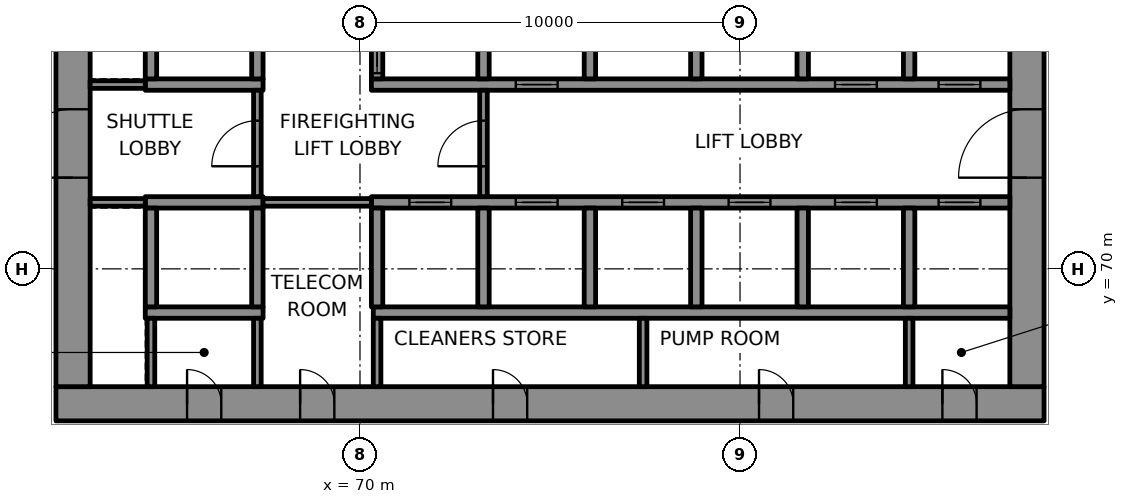
"""IFC4 building model, lengths in metres.
Left out: names, types, materials, properties, quantities, classifications, styles, units other than length and angle.
Written with IfcOpenShell. Run it as: python <this file> out.ifc"""

import sys

from ifc_helpers import new_model, si_unit, direction, frame, frame_2d, origin, place, context, subcontext, project, spatial, rectangle, extrude, element, fill, save


model = new_model("IFC4")
c1 = context("Model", 3, precision=1e-05, world=origin(), true_north=direction((0.0, 1.0)))
c2 = subcontext(c1, "Body", "Model", "MODEL_VIEW")
j1 = project(units=[si_unit("LENGTHUNIT", "METRE"), si_unit("PLANEANGLEUNIT", "RADIAN")], contexts=[c1])
p1 = place(None, origin())
s1 = spatial("IfcSite", under=j1, at=p1, CompositionType="ELEMENT")
p2 = place(p1, origin())
s2 = spatial("IfcBuilding", under=s1, at=p2, CompositionType="ELEMENT")
p3 = place(p2, frame((0.0, 0.0, 98.8)))
s3 = spatial("IfcBuildingStorey", under=s2, at=p3, CompositionType="ELEMENT", Elevation=98.8)
p4 = place(p3, frame((62.0, 66.45, 0.0), z_axis=(0.0, 0.0, 1.0), x_axis=(1.0, 0.0, 0.0)))
e1 = element("IfcWall", 1, at=p4, inside=s3, PredefinedType="SHEAR", context=c2, shape_type="SweptSolid", body=[
    extrude(rectangle(XDim=26.0, YDim=0.9, at=frame_2d((13.0, 0.0))), origin(), (0.0, 0.0, 1.0), 4.0),
])
p5 = place(p4, frame((3.45, 0.0, 0.0)))
e2 = element("IfcOpeningElement", 2, at=p5, cuts=e1, PredefinedType="OPENING", context=c2, shape_type="SweptSolid", body=[
    extrude(rectangle(XDim=0.9, YDim=2.1, at=frame_2d((0.45, 1.05))), frame((0.0, 0.46, 0.0), z_axis=(0.0, -1.0, 0.0), x_axis=(1.0, 0.0, 0.0)), (0.0, 0.0, 1.0), 0.92),
])
p6 = place(p4, frame((6.425, 0.0, 0.0)))
e3 = element("IfcOpeningElement", 3, at=p6, cuts=e1, PredefinedType="OPENING", context=c2, shape_type="SweptSolid", body=[
    extrude(rectangle(XDim=0.9, YDim=2.1, at=frame_2d((0.45, 1.05))), frame((0.0, 0.46, 0.0), z_axis=(0.0, -1.0, 0.0), x_axis=(1.0, 0.0, 0.0)), (0.0, 0.0, 1.0), 0.92),
])
p7 = place(p4, frame((11.5, 0.0, 0.0)))
e4 = element("IfcOpeningElement", 4, at=p7, cuts=e1, PredefinedType="OPENING", context=c2, shape_type="SweptSolid", body=[
    extrude(rectangle(XDim=0.9, YDim=2.1, at=frame_2d((0.45, 1.05))), frame((0.0, 0.46, 0.0), z_axis=(0.0, -1.0, 0.0), x_axis=(1.0, 0.0, 0.0)), (0.0, 0.0, 1.0), 0.92),
])
p8 = place(p4, frame((18.5, 0.0, 0.0)))
e5 = element("IfcOpeningElement", 5, at=p8, cuts=e1, PredefinedType="OPENING", context=c2, shape_type="SweptSolid", body=[
    extrude(rectangle(XDim=0.9, YDim=2.1, at=frame_2d((0.45, 1.05))), frame((0.0, 0.46, 0.0), z_axis=(0.0, -1.0, 0.0), x_axis=(1.0, 0.0, 0.0)), (0.0, 0.0, 1.0), 0.92),
])
p9 = place(p4, frame((23.325, 0.0, 0.0)))
e6 = element("IfcOpeningElement", 6, at=p9, cuts=e1, PredefinedType="OPENING", context=c2, shape_type="SweptSolid", body=[
    extrude(rectangle(XDim=0.9, YDim=2.1, at=frame_2d((0.45, 1.05))), frame((0.0, 0.46, 0.0), z_axis=(0.0, -1.0, 0.0), x_axis=(1.0, 0.0, 0.0)), (0.0, 0.0, 1.0), 0.92),
])
p10 = place(p3, frame((62.45, 66.9, 0.0), z_axis=(0.0, 0.0, 1.0), x_axis=(0.0, 1.0, 0.0)))
e7 = element("IfcWall", 7, at=p10, inside=s3, PredefinedType="SHEAR", context=c2, shape_type="SweptSolid", body=[
    extrude(rectangle(XDim=16.2, YDim=0.9, at=frame_2d((8.1, 0.0))), origin(), (0.0, 0.0, 1.0), 4.0),
])
p11 = place(p10, frame((5.5, 0.0, 0.0)))
e8 = element("IfcOpeningElement", 8, at=p11, cuts=e7, PredefinedType="OPENING", context=c2, shape_type="SweptSolid", body=[
    extrude(rectangle(XDim=1.8, YDim=2.1, at=frame_2d((0.9, 1.05))), frame((0.0, 0.46, 0.0), z_axis=(0.0, -1.0, 0.0), x_axis=(1.0, 0.0, 0.0)), (0.0, 0.0, 1.0), 0.92),
])
p12 = place(p3, frame((87.55, 66.9, 0.0), z_axis=(0.0, 0.0, 1.0), x_axis=(0.0, 1.0, 0.0)))
e9 = element("IfcWall", 9, at=p12, inside=s3, PredefinedType="SHEAR", context=c2, shape_type="SweptSolid", body=[
    extrude(rectangle(XDim=16.2, YDim=0.9, at=frame_2d((8.1, 0.0))), origin(), (0.0, 0.0, 1.0), 4.0),
])
p13 = place(p12, frame((5.5, 0.0, 0.0)))
e10 = element("IfcOpeningElement", 10, at=p13, cuts=e9, PredefinedType="OPENING", context=c2, shape_type="SweptSolid", body=[
    extrude(rectangle(XDim=1.8, YDim=2.1, at=frame_2d((0.9, 1.05))), frame((0.0, 0.46, 0.0), z_axis=(0.0, -1.0, 0.0), x_axis=(1.0, 0.0, 0.0)), (0.0, 0.0, 1.0), 0.92),
])
p14 = place(p12, frame((12.272, 0.0, 0.0)))
e11 = element("IfcOpeningElement", 11, at=p14, cuts=e9, PredefinedType="OPENING", context=c2, shape_type="SweptSolid", body=[
    extrude(rectangle(XDim=0.9, YDim=2.1, at=frame_2d((0.45, 1.05))), frame((0.0, 0.46, 0.0), z_axis=(0.0, -1.0, 0.0), x_axis=(1.0, 0.0, 0.0)), (0.0, 0.0, 1.0), 0.92),
])
p15 = place(p3, frame((64.35, 68.85, 0.0), z_axis=(0.0, 0.0, 1.0), x_axis=(1.0, 0.0, 0.0)))
e12 = element("IfcWall", 12, at=p15, inside=s3, PredefinedType="SHEAR", context=c2, shape_type="SweptSolid", body=[
    extrude(rectangle(XDim=3.1, YDim=0.3, at=frame_2d((1.55, 0.0))), origin(), (0.0, 0.0, 1.0), 4.0),
])
p16 = place(p3, frame((70.35, 68.85, 0.0), z_axis=(0.0, 0.0, 1.0), x_axis=(1.0, 0.0, 0.0)))
e13 = element("IfcWall", 13, at=p16, inside=s3, PredefinedType="SHEAR", context=c2, shape_type="SweptSolid", body=[
    extrude(rectangle(XDim=16.75, YDim=0.3, at=frame_2d((8.375, 0.0))), origin(), (0.0, 0.0, 1.0), 4.0),
])
p17 = place(p3, frame((64.35, 71.75, 0.0), z_axis=(0.0, 0.0, 1.0), x_axis=(1.0, 0.0, 0.0)))
e14 = element("IfcWall", 14, at=p17, inside=s3, PredefinedType="SHEAR", context=c2, shape_type="SweptSolid", body=[
    extrude(rectangle(XDim=3.1, YDim=0.3, at=frame_2d((1.55, 0.0))), origin(), (0.0, 0.0, 1.0), 4.0),
])
p18 = place(p3, frame((70.3, 71.75, 0.0), z_axis=(0.0, 0.0, 1.0), x_axis=(1.0, 0.0, 0.0)))
e15 = element("IfcWall", 15, at=p18, inside=s3, PredefinedType="SHEAR", context=c2, shape_type="SweptSolid", body=[
    extrude(rectangle(XDim=16.8, YDim=0.3, at=frame_2d((8.4, 0.0))), origin(), (0.0, 0.0, 1.0), 4.0),
])
p19 = place(p18, frame((1.0, 0.0, 0.0)))
e16 = element("IfcOpeningElement", 16, at=p19, cuts=e15, PredefinedType="OPENING", context=c2, shape_type="SweptSolid", body=[
    extrude(rectangle(XDim=1.1, YDim=2.1, at=frame_2d((0.55, 1.05))), frame((0.0, 0.16, 0.0), z_axis=(0.0, -1.0, 0.0), x_axis=(1.0, 0.0, 0.0)), (0.0, 0.0, 1.0), 0.32),
])
p20 = place(p18, frame((3.8, 0.0, 0.0)))
e17 = element("IfcOpeningElement", 17, at=p20, cuts=e15, PredefinedType="OPENING", context=c2, shape_type="SweptSolid", body=[
    extrude(rectangle(XDim=1.1, YDim=2.1, at=frame_2d((0.55, 1.05))), frame((0.0, 0.16, 0.0), z_axis=(0.0, -1.0, 0.0), x_axis=(1.0, 0.0, 0.0)), (0.0, 0.0, 1.0), 0.32),
])
p21 = place(p18, frame((6.6, 0.0, 0.0)))
e18 = element("IfcOpeningElement", 18, at=p21, cuts=e15, PredefinedType="OPENING", context=c2, shape_type="SweptSolid", body=[
    extrude(rectangle(XDim=1.1, YDim=2.1, at=frame_2d((0.55, 1.05))), frame((0.0, 0.16, 0.0), z_axis=(0.0, -1.0, 0.0), x_axis=(1.0, 0.0, 0.0)), (0.0, 0.0, 1.0), 0.32),
])
p22 = place(p18, frame((9.4, 0.0, 0.0)))
e19 = element("IfcOpeningElement", 19, at=p22, cuts=e15, PredefinedType="OPENING", context=c2, shape_type="SweptSolid", body=[
    extrude(rectangle(XDim=1.1, YDim=2.1, at=frame_2d((0.55, 1.05))), frame((0.0, 0.16, 0.0), z_axis=(0.0, -1.0, 0.0), x_axis=(1.0, 0.0, 0.0)), (0.0, 0.0, 1.0), 0.32),
])
p23 = place(p18, frame((12.2, 0.0, 0.0)))
e20 = element("IfcOpeningElement", 20, at=p23, cuts=e15, PredefinedType="OPENING", context=c2, shape_type="SweptSolid", body=[
    extrude(rectangle(XDim=1.1, YDim=2.1, at=frame_2d((0.55, 1.05))), frame((0.0, 0.16, 0.0), z_axis=(0.0, -1.0, 0.0), x_axis=(1.0, 0.0, 0.0)), (0.0, 0.0, 1.0), 0.32),
])
p24 = place(p18, frame((14.925, 0.0, 0.0)))
e21 = element("IfcOpeningElement", 21, at=p24, cuts=e15, PredefinedType="OPENING", context=c2, shape_type="SweptSolid", body=[
    extrude(rectangle(XDim=1.1, YDim=2.1, at=frame_2d((0.55, 1.05))), frame((0.0, 0.16, 0.0), z_axis=(0.0, -1.0, 0.0), x_axis=(1.0, 0.0, 0.0)), (0.0, 0.0, 1.0), 0.32),
])
p25 = place(p3, frame((64.35, 74.85, 0.0), z_axis=(0.0, 0.0, 1.0), x_axis=(1.0, 0.0, 0.0)))
e22 = element("IfcWall", 22, at=p25, inside=s3, PredefinedType="SHEAR", context=c2, shape_type="SweptSolid", body=[
    extrude(rectangle(XDim=3.1, YDim=0.3, at=frame_2d((1.55, 0.0))), origin(), (0.0, 0.0, 1.0), 4.0),
])
p26 = place(p3, frame((70.3, 74.85, 0.0), z_axis=(0.0, 0.0, 1.0), x_axis=(1.0, 0.0, 0.0)))
e23 = element("IfcWall", 23, at=p26, inside=s3, PredefinedType="SHEAR", context=c2, shape_type="SweptSolid", body=[
    extrude(rectangle(XDim=16.8, YDim=0.3, at=frame_2d((8.4, 0.0))), origin(), (0.0, 0.0, 1.0), 4.0),
])
p27 = place(p26, frame((3.8, 0.0, 0.0)))
e24 = element("IfcOpeningElement", 24, at=p27, cuts=e23, PredefinedType="OPENING", context=c2, shape_type="SweptSolid", body=[
    extrude(rectangle(XDim=1.1, YDim=2.1, at=frame_2d((0.55, 1.05))), frame((0.0, 0.16, 0.0), z_axis=(0.0, -1.0, 0.0), x_axis=(1.0, 0.0, 0.0)), (0.0, 0.0, 1.0), 0.32),
])
p28 = place(p26, frame((12.2, 0.0, 0.0)))
e25 = element("IfcOpeningElement", 25, at=p28, cuts=e23, PredefinedType="OPENING", context=c2, shape_type="SweptSolid", body=[
    extrude(rectangle(XDim=1.1, YDim=2.1, at=frame_2d((0.55, 1.05))), frame((0.0, 0.16, 0.0), z_axis=(0.0, -1.0, 0.0), x_axis=(1.0, 0.0, 0.0)), (0.0, 0.0, 1.0), 0.32),
])
p29 = place(p26, frame((14.925, 0.0, 0.0)))
e26 = element("IfcOpeningElement", 26, at=p29, cuts=e23, PredefinedType="OPENING", context=c2, shape_type="SweptSolid", body=[
    extrude(rectangle(XDim=1.1, YDim=2.1, at=frame_2d((0.55, 1.05))), frame((0.0, 0.16, 0.0), z_axis=(0.0, -1.0, 0.0), x_axis=(1.0, 0.0, 0.0)), (0.0, 0.0, 1.0), 0.32),
])
for number, where, z_axis, x_axis in (
    (27, (64.5, 69.0, 0.0), (0.0, 0.0, 1.0), (0.0, 1.0, 0.0)),
    (28, (64.5, 75.0, 0.0), (0.0, 0.0, 1.0), (0.0, 1.0, 0.0)),
    (29, (67.3, 69.0, 0.0), (0.0, 0.0, 1.0), (0.0, 1.0, 0.0)),
    (30, (67.3, 75.0, 0.0), (0.0, 0.0, 1.0), (0.0, 1.0, 0.0)),
    (31, (70.45, 69.0, 0.0), (0.0, 0.0, 1.0), (0.0, 1.0, 0.0)),
):
    element("IfcWall", number, at=place(p3, frame(where, z_axis=z_axis, x_axis=x_axis)), inside=s3, PredefinedType="SHEAR", context=c2, shape_type="SweptSolid", body=[
        extrude(rectangle(XDim=2.6, YDim=0.3, at=frame_2d((1.3, 0.0))), origin(), (0.0, 0.0, 1.0), 4.0),
    ])
p30 = place(p3, frame((70.45, 75.0, 0.0), z_axis=(0.0, 0.0, 1.0), x_axis=(0.0, 1.0, 0.0)))
e32 = element("IfcWall", 32, at=p30, inside=s3, PredefinedType="SHEAR", context=c2, shape_type="SweptSolid", body=[
    extrude(rectangle(XDim=2.6, YDim=0.3, at=frame_2d((1.3, 0.0))), origin(), (0.0, 0.0, 1.0), 4.0),
])
p31 = place(p30, frame((0.15, 0.0, 0.0)))
e33 = element("IfcOpeningElement", 33, at=p31, cuts=e32, PredefinedType="OPENING", context=c2, shape_type="SweptSolid", body=[
    extrude(rectangle(XDim=1.1, YDim=2.1, at=frame_2d((0.55, 1.05))), frame((0.0, 0.16, 0.0), z_axis=(0.0, -1.0, 0.0), x_axis=(1.0, 0.0, 0.0)), (0.0, 0.0, 1.0), 0.32),
])
for number, where, z_axis, x_axis in (
    (34, (73.25, 69.0, 0.0), (0.0, 0.0, 1.0), (0.0, 1.0, 0.0)),
    (35, (73.25, 75.0, 0.0), (0.0, 0.0, 1.0), (0.0, 1.0, 0.0)),
    (36, (76.05, 69.0, 0.0), (0.0, 0.0, 1.0), (0.0, 1.0, 0.0)),
    (37, (76.05, 75.0, 0.0), (0.0, 0.0, 1.0), (0.0, 1.0, 0.0)),
    (38, (78.85, 69.0, 0.0), (0.0, 0.0, 1.0), (0.0, 1.0, 0.0)),
    (39, (78.85, 75.0, 0.0), (0.0, 0.0, 1.0), (0.0, 1.0, 0.0)),
    (40, (81.65, 69.0, 0.0), (0.0, 0.0, 1.0), (0.0, 1.0, 0.0)),
    (41, (81.65, 75.0, 0.0), (0.0, 0.0, 1.0), (0.0, 1.0, 0.0)),
    (42, (84.45, 69.0, 0.0), (0.0, 0.0, 1.0), (0.0, 1.0, 0.0)),
    (43, (84.45, 75.0, 0.0), (0.0, 0.0, 1.0), (0.0, 1.0, 0.0)),
):
    element("IfcWall", number, at=place(p3, frame(where, z_axis=z_axis, x_axis=x_axis)), inside=s3, PredefinedType="SHEAR", context=c2, shape_type="SweptSolid", body=[
        extrude(rectangle(XDim=2.6, YDim=0.3, at=frame_2d((1.3, 0.0))), origin(), (0.0, 0.0, 1.0), 4.0),
    ])
p32 = place(p3, frame((62.9, 71.75, 0.0), z_axis=(0.0, 0.0, 1.0), x_axis=(1.0, 0.0, 0.0)))
e44 = element("IfcWall", 44, at=p32, inside=s3, PredefinedType="PARTITIONING", context=c2, shape_type="SweptSolid", body=[
    extrude(rectangle(XDim=1.45, YDim=0.2, at=frame_2d((0.725, 0.0))), origin(), (0.0, 0.0, 1.0), 4.0),
])
p33 = place(p3, frame((67.45, 71.75, 0.0), z_axis=(0.0, 0.0, 1.0), x_axis=(1.0, 0.0, 0.0)))
e45 = element("IfcWall", 45, at=p33, inside=s3, PredefinedType="PARTITIONING", context=c2, shape_type="SweptSolid", body=[
    extrude(rectangle(XDim=2.85, YDim=0.2, at=frame_2d((1.425, 0.0))), origin(), (0.0, 0.0, 1.0), 4.0),
])
p34 = place(p3, frame((62.9, 74.85, 0.0), z_axis=(0.0, 0.0, 1.0), x_axis=(1.0, 0.0, 0.0)))
e46 = element("IfcWall", 46, at=p34, inside=s3, PredefinedType="PARTITIONING", context=c2, shape_type="SweptSolid", body=[
    extrude(rectangle(XDim=1.45, YDim=0.2, at=frame_2d((0.725, 0.0))), origin(), (0.0, 0.0, 1.0), 4.0),
])
for number, where, z_axis, x_axis in (
    (47, (64.5, 66.9, 0.0), (0.0, 0.0, 1.0), (0.0, 1.0, 0.0)),
    (48, (67.3, 66.9, 0.0), (0.0, 0.0, 1.0), (0.0, 1.0, 0.0)),
):
    element("IfcWall", number, at=place(p3, frame(where, z_axis=z_axis, x_axis=x_axis)), inside=s3, PredefinedType="PARTITIONING", context=c2, shape_type="SweptSolid", body=[
        extrude(rectangle(XDim=1.8, YDim=0.2, at=frame_2d((0.9, 0.0))), origin(), (0.0, 0.0, 1.0), 4.0),
    ])
p35 = place(p3, frame((67.3, 71.9, 0.0), z_axis=(0.0, 0.0, 1.0), x_axis=(0.0, 1.0, 0.0)))
e49 = element("IfcWall", 49, at=p35, inside=s3, PredefinedType="PARTITIONING", context=c2, shape_type="SweptSolid", body=[
    extrude(rectangle(XDim=2.8, YDim=0.2, at=frame_2d((1.4, 0.0))), origin(), (0.0, 0.0, 1.0), 4.0),
])
p36 = place(p35, frame((0.8, 0.0, 0.0)))
e50 = element("IfcOpeningElement", 50, at=p36, cuts=e49, PredefinedType="OPENING", context=c2, shape_type="SweptSolid", body=[
    extrude(rectangle(XDim=1.2, YDim=2.1, at=frame_2d((0.6, 1.05))), frame((0.0, 0.11, 0.0), z_axis=(0.0, -1.0, 0.0), x_axis=(1.0, 0.0, 0.0)), (0.0, 0.0, 1.0), 0.22),
])
p37 = place(p3, frame((70.45, 66.9, 0.0), z_axis=(0.0, 0.0, 1.0), x_axis=(0.0, 1.0, 0.0)))
e51 = element("IfcWall", 51, at=p37, inside=s3, PredefinedType="PARTITIONING", context=c2, shape_type="SweptSolid", body=[
    extrude(rectangle(XDim=1.8, YDim=0.2, at=frame_2d((0.9, 0.0))), origin(), (0.0, 0.0, 1.0), 4.0),
])
p38 = place(p3, frame((73.25, 71.9, 0.0), z_axis=(0.0, 0.0, 1.0), x_axis=(0.0, 1.0, 0.0)))
e52 = element("IfcWall", 52, at=p38, inside=s3, PredefinedType="PARTITIONING", context=c2, shape_type="SweptSolid", body=[
    extrude(rectangle(XDim=2.8, YDim=0.2, at=frame_2d((1.4, 0.0))), origin(), (0.0, 0.0, 1.0), 4.0),
])
p39 = place(p38, frame((0.8, 0.0, 0.0)))
e53 = element("IfcOpeningElement", 53, at=p39, cuts=e52, PredefinedType="OPENING", context=c2, shape_type="SweptSolid", body=[
    extrude(rectangle(XDim=1.2, YDim=2.1, at=frame_2d((0.6, 1.05))), frame((0.0, 0.11, 0.0), z_axis=(0.0, -1.0, 0.0), x_axis=(1.0, 0.0, 0.0)), (0.0, 0.0, 1.0), 0.22),
])
for number, where, z_axis, x_axis in (
    (54, (77.45, 66.9, 0.0), (0.0, 0.0, 1.0), (0.0, 1.0, 0.0)),
    (55, (84.45, 66.9, 0.0), (0.0, 0.0, 1.0), (0.0, 1.0, 0.0)),
):
    element("IfcWall", number, at=place(p3, frame(where, z_axis=z_axis, x_axis=x_axis)), inside=s3, PredefinedType="PARTITIONING", context=c2, shape_type="SweptSolid", body=[
        extrude(rectangle(XDim=1.8, YDim=0.2, at=frame_2d((0.9, 0.0))), origin(), (0.0, 0.0, 1.0), 4.0),
    ])
p40 = place(p19, origin())
e56 = element("IfcDoor", 56, at=p40, inside=s3, OperationType="DOUBLE_DOOR_SLIDING", PredefinedType="DOOR", context=c2, shape_type="SweptSolid", body=[
    extrude(rectangle(XDim=1.1, YDim=2.1, at=frame_2d((0.55, 1.05))), frame((0.0, 0.025, 0.0), z_axis=(0.0, -1.0, 0.0), x_axis=(1.0, 0.0, 0.0)), (0.0, 0.0, 1.0), 0.05),
])
fill(e16, e56)
p41 = place(p20, origin())
e57 = element("IfcDoor", 57, at=p41, inside=s3, OperationType="DOUBLE_DOOR_SLIDING", PredefinedType="DOOR", context=c2, shape_type="SweptSolid", body=[
    extrude(rectangle(XDim=1.1, YDim=2.1, at=frame_2d((0.55, 1.05))), frame((0.0, 0.025, 0.0), z_axis=(0.0, -1.0, 0.0), x_axis=(1.0, 0.0, 0.0)), (0.0, 0.0, 1.0), 0.05),
])
fill(e17, e57)
p42 = place(p21, origin())
e58 = element("IfcDoor", 58, at=p42, inside=s3, OperationType="DOUBLE_DOOR_SLIDING", PredefinedType="DOOR", context=c2, shape_type="SweptSolid", body=[
    extrude(rectangle(XDim=1.1, YDim=2.1, at=frame_2d((0.55, 1.05))), frame((0.0, 0.025, 0.0), z_axis=(0.0, -1.0, 0.0), x_axis=(1.0, 0.0, 0.0)), (0.0, 0.0, 1.0), 0.05),
])
fill(e18, e58)
p43 = place(p22, origin())
e59 = element("IfcDoor", 59, at=p43, inside=s3, OperationType="DOUBLE_DOOR_SLIDING", PredefinedType="DOOR", context=c2, shape_type="SweptSolid", body=[
    extrude(rectangle(XDim=1.1, YDim=2.1, at=frame_2d((0.55, 1.05))), frame((0.0, 0.025, 0.0), z_axis=(0.0, -1.0, 0.0), x_axis=(1.0, 0.0, 0.0)), (0.0, 0.0, 1.0), 0.05),
])
fill(e19, e59)
p44 = place(p23, origin())
e60 = element("IfcDoor", 60, at=p44, inside=s3, OperationType="DOUBLE_DOOR_SLIDING", PredefinedType="DOOR", context=c2, shape_type="SweptSolid", body=[
    extrude(rectangle(XDim=1.1, YDim=2.1, at=frame_2d((0.55, 1.05))), frame((0.0, 0.025, 0.0), z_axis=(0.0, -1.0, 0.0), x_axis=(1.0, 0.0, 0.0)), (0.0, 0.0, 1.0), 0.05),
])
fill(e20, e60)
p45 = place(p24, origin())
e61 = element("IfcDoor", 61, at=p45, inside=s3, OperationType="DOUBLE_DOOR_SLIDING", PredefinedType="DOOR", context=c2, shape_type="SweptSolid", body=[
    extrude(rectangle(XDim=1.1, YDim=2.1, at=frame_2d((0.55, 1.05))), frame((0.0, 0.025, 0.0), z_axis=(0.0, -1.0, 0.0), x_axis=(1.0, 0.0, 0.0)), (0.0, 0.0, 1.0), 0.05),
])
fill(e21, e61)
p46 = place(p31, origin())
e62 = element("IfcDoor", 62, at=p46, inside=s3, OperationType="DOUBLE_DOOR_SLIDING", PredefinedType="DOOR", context=c2, shape_type="SweptSolid", body=[
    extrude(rectangle(XDim=1.1, YDim=2.1, at=frame_2d((0.55, 1.05))), frame((0.0, 0.025, 0.0), z_axis=(0.0, -1.0, 0.0), x_axis=(1.0, 0.0, 0.0)), (0.0, 0.0, 1.0), 0.05),
])
fill(e33, e62)
p47 = place(p27, origin())
e63 = element("IfcDoor", 63, at=p47, inside=s3, OperationType="DOUBLE_DOOR_SLIDING", PredefinedType="DOOR", context=c2, shape_type="SweptSolid", body=[
    extrude(rectangle(XDim=1.1, YDim=2.1, at=frame_2d((0.55, 1.05))), frame((0.0, 0.025, 0.0), z_axis=(0.0, -1.0, 0.0), x_axis=(1.0, 0.0, 0.0)), (0.0, 0.0, 1.0), 0.05),
])
fill(e24, e63)
p48 = place(p28, origin())
e64 = element("IfcDoor", 64, at=p48, inside=s3, OperationType="DOUBLE_DOOR_SLIDING", PredefinedType="DOOR", context=c2, shape_type="SweptSolid", body=[
    extrude(rectangle(XDim=1.1, YDim=2.1, at=frame_2d((0.55, 1.05))), frame((0.0, 0.025, 0.0), z_axis=(0.0, -1.0, 0.0), x_axis=(1.0, 0.0, 0.0)), (0.0, 0.0, 1.0), 0.05),
])
fill(e25, e64)
p49 = place(p29, origin())
e65 = element("IfcDoor", 65, at=p49, inside=s3, OperationType="DOUBLE_DOOR_SLIDING", PredefinedType="DOOR", context=c2, shape_type="SweptSolid", body=[
    extrude(rectangle(XDim=1.1, YDim=2.1, at=frame_2d((0.55, 1.05))), frame((0.0, 0.025, 0.0), z_axis=(0.0, -1.0, 0.0), x_axis=(1.0, 0.0, 0.0)), (0.0, 0.0, 1.0), 0.05),
])
fill(e26, e65)
p50 = place(p39, origin())
e66 = element("IfcDoor", 66, at=p50, inside=s3, OperationType="SINGLE_SWING_LEFT", PredefinedType="DOOR", context=c2, shape_type="SweptSolid", body=[
    extrude(rectangle(XDim=1.2, YDim=2.1, at=frame_2d((0.6, 1.05))), frame((0.0, 0.025, 0.0), z_axis=(0.0, -1.0, 0.0), x_axis=(1.0, 0.0, 0.0)), (0.0, 0.0, 1.0), 0.05),
])
fill(e53, e66)
p51 = place(p36, origin())
e67 = element("IfcDoor", 67, at=p51, inside=s3, OperationType="SINGLE_SWING_RIGHT", PredefinedType="DOOR", context=c2, shape_type="SweptSolid", body=[
    extrude(rectangle(XDim=1.2, YDim=2.1, at=frame_2d((0.6, 1.05))), frame((0.0, 0.025, 0.0), z_axis=(0.0, -1.0, 0.0), x_axis=(1.0, 0.0, 0.0)), (0.0, 0.0, 1.0), 0.05),
])
fill(e50, e67)
p52 = place(p11, origin())
e68 = element("IfcDoor", 68, at=p52, inside=s3, OperationType="SINGLE_SWING_LEFT", PredefinedType="DOOR", context=c2, shape_type="SweptSolid", body=[
    extrude(rectangle(XDim=1.8, YDim=2.1, at=frame_2d((0.9, 1.05))), frame((0.0, 0.17, 0.0), z_axis=(0.0, -1.0, 0.0), x_axis=(1.0, 0.0, 0.0)), (0.0, 0.0, 1.0), 0.34),
])
fill(e8, e68)
p53 = place(p13, origin())
e69 = element("IfcDoor", 69, at=p53, inside=s3, OperationType="SINGLE_SWING_RIGHT", PredefinedType="DOOR", context=c2, shape_type="SweptSolid", body=[
    extrude(rectangle(XDim=1.8, YDim=2.1, at=frame_2d((0.9, 1.05))), frame((0.0, 0.17, 0.0), z_axis=(0.0, -1.0, 0.0), x_axis=(1.0, 0.0, 0.0)), (0.0, 0.0, 1.0), 0.34),
])
fill(e10, e69)
p54 = place(p5, origin())
e70 = element("IfcDoor", 70, at=p54, inside=s3, OperationType="SINGLE_SWING_LEFT", PredefinedType="DOOR", context=c2, shape_type="SweptSolid", body=[
    extrude(rectangle(XDim=0.9, YDim=2.1, at=frame_2d((0.45, 1.05))), frame((0.0, 0.17, 0.0), z_axis=(0.0, -1.0, 0.0), x_axis=(1.0, 0.0, 0.0)), (0.0, 0.0, 1.0), 0.34),
])
fill(e2, e70)
p55 = place(p6, origin())
e71 = element("IfcDoor", 71, at=p55, inside=s3, OperationType="SINGLE_SWING_RIGHT", PredefinedType="DOOR", context=c2, shape_type="SweptSolid", body=[
    extrude(rectangle(XDim=0.9, YDim=2.1, at=frame_2d((0.45, 1.05))), frame((0.0, 0.17, 0.0), z_axis=(0.0, -1.0, 0.0), x_axis=(1.0, 0.0, 0.0)), (0.0, 0.0, 1.0), 0.34),
])
fill(e3, e71)
p56 = place(p7, origin())
e72 = element("IfcDoor", 72, at=p56, inside=s3, OperationType="SINGLE_SWING_LEFT", PredefinedType="DOOR", context=c2, shape_type="SweptSolid", body=[
    extrude(rectangle(XDim=0.9, YDim=2.1, at=frame_2d((0.45, 1.05))), frame((0.0, 0.17, 0.0), z_axis=(0.0, -1.0, 0.0), x_axis=(1.0, 0.0, 0.0)), (0.0, 0.0, 1.0), 0.34),
])
fill(e4, e72)
p57 = place(p8, origin())
e73 = element("IfcDoor", 73, at=p57, inside=s3, OperationType="SINGLE_SWING_RIGHT", PredefinedType="DOOR", context=c2, shape_type="SweptSolid", body=[
    extrude(rectangle(XDim=0.9, YDim=2.1, at=frame_2d((0.45, 1.05))), frame((0.0, 0.17, 0.0), z_axis=(0.0, -1.0, 0.0), x_axis=(1.0, 0.0, 0.0)), (0.0, 0.0, 1.0), 0.34),
])
fill(e5, e73)
p58 = place(p9, origin())
e74 = element("IfcDoor", 74, at=p58, inside=s3, OperationType="SINGLE_SWING_LEFT", PredefinedType="DOOR", context=c2, shape_type="SweptSolid", body=[
    extrude(rectangle(XDim=0.9, YDim=2.1, at=frame_2d((0.45, 1.05))), frame((0.0, 0.17, 0.0), z_axis=(0.0, -1.0, 0.0), x_axis=(1.0, 0.0, 0.0)), (0.0, 0.0, 1.0), 0.34),
])
fill(e6, e74)
save(model, sys.argv[1])
